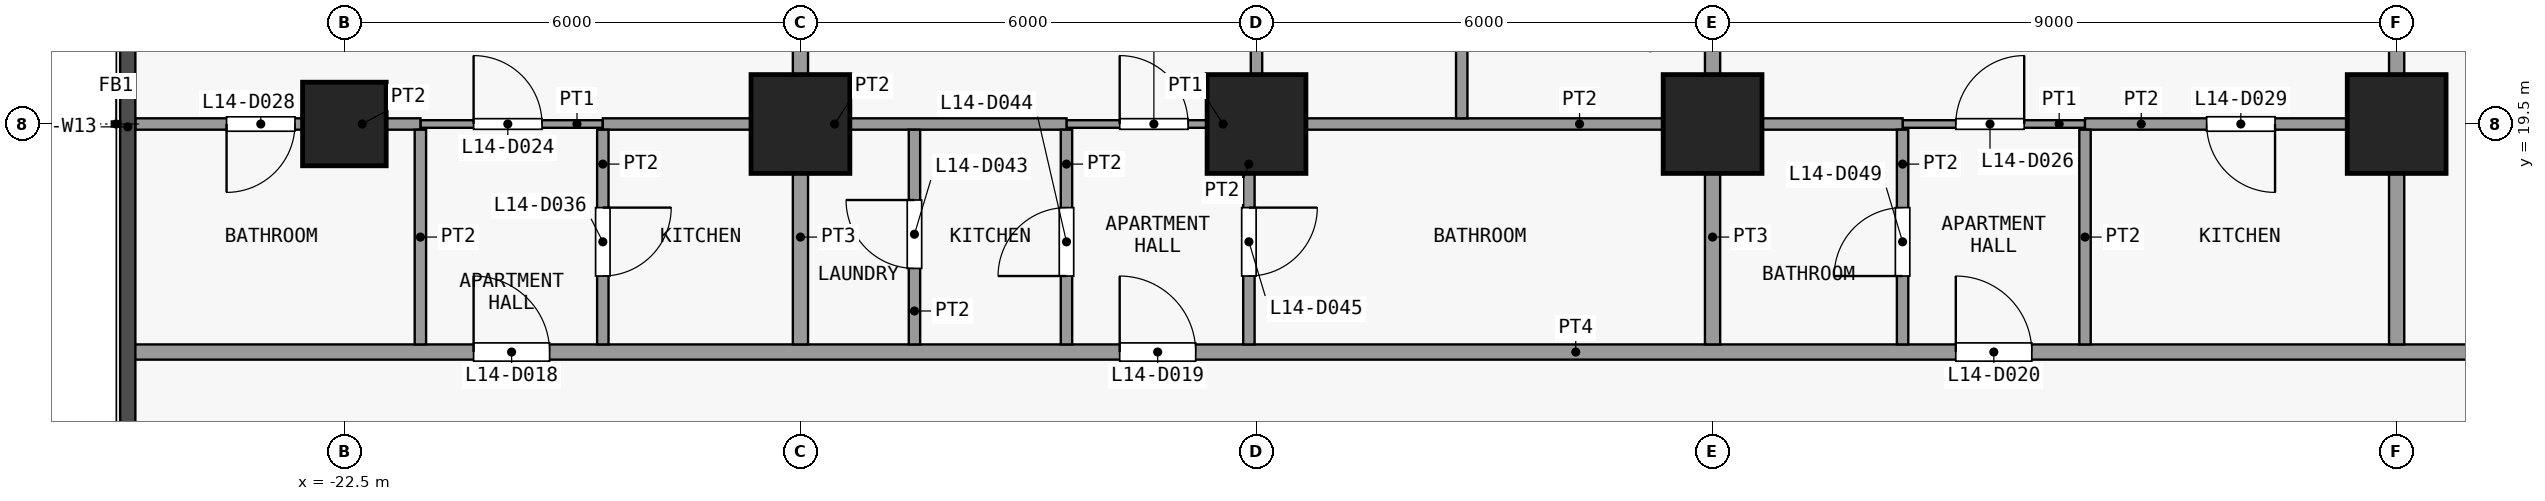
"""IFC4 building model, lengths in metres.
Left out: names, types, materials, properties, quantities, classifications, styles, units other than length and angle.
Written with IfcOpenShell. Run it as: python <this file> out.ifc"""

import sys

from ifc_helpers import new_model, si_unit, direction, frame, frame_2d, origin, origin_2d, place, context, subcontext, project, spatial, rectangle, extrude, element, fill, save


model = new_model("IFC4")
c1 = context("Model", 3, precision=1e-05, world=origin(), true_north=direction((0.0, 1.0)))
c2 = subcontext(c1, "Body", "Model", "MODEL_VIEW")
j1 = project(units=[si_unit("LENGTHUNIT", "METRE"), si_unit("PLANEANGLEUNIT", "RADIAN")], contexts=[c1])
p1 = place(None, origin())
s1 = spatial("IfcSite", under=j1, at=p1, CompositionType="ELEMENT")
p2 = place(p1, origin())
s2 = spatial("IfcBuilding", under=s1, at=p2, CompositionType="ELEMENT")
p3 = place(p2, frame((0.0, 0.0, 61.3)))
s3 = spatial("IfcBuildingStorey", under=s2, at=p3, CompositionType="ELEMENT", Elevation=61.3)
p4 = place(p3, frame((-22.5, 19.5, 0.0), z_axis=(0.0, 0.0, 1.0), x_axis=(1.0, 0.0, 0.0)))
e1 = element("IfcColumn", 1, at=p4, inside=s3, PredefinedType="COLUMN", context=c2, shape_type="SweptSolid", body=[
    extrude(rectangle(XDim=1.1, YDim=1.1, at=origin_2d()), origin(), (0.0, 0.0, 1.0), 3.6),
])
for number, where, z_axis, x_axis in (
    (2, (-16.5, 19.5, 0.0), (0.0, 0.0, 1.0), (1.0, 0.0, 0.0)),
    (3, (-10.5, 19.5, 0.0), (0.0, 0.0, 1.0), (1.0, 0.0, 0.0)),
    (4, (-4.5, 19.5, 0.0), (0.0, 0.0, 1.0), (1.0, 0.0, 0.0)),
    (5, (4.5, 19.5, 0.0), (0.0, 0.0, 1.0), (1.0, 0.0, 0.0)),
):
    element("IfcColumn", number, at=place(p3, frame(where, z_axis=z_axis, x_axis=x_axis)), inside=s3, PredefinedType="COLUMN", context=c2, shape_type="SweptSolid", body=[
        extrude(rectangle(XDim=1.3, YDim=1.3, at=origin_2d()), origin(), (0.0, 0.0, 1.0), 3.6),
    ])
p5 = place(p3, frame((-25.35, 16.5, 0.0), z_axis=(0.0, 0.0, 1.0), x_axis=(1.0, 0.0, 0.0)))
e6 = element("IfcWall", 6, at=p5, inside=s3, PredefinedType="PARTITIONING", context=c2, shape_type="SweptSolid", body=[
    extrude(rectangle(XDim=50.7, YDim=0.2, at=frame_2d((25.35, 0.0))), origin(), (0.0, 0.0, 1.0), 3.3),
])
p6 = place(p5, frame((4.55, 0.0, 0.0)))
e7 = element("IfcOpeningElement", 7, at=p6, cuts=e6, PredefinedType="OPENING", context=c2, shape_type="SweptSolid", body=[
    extrude(rectangle(XDim=1.0, YDim=2.1, at=frame_2d((0.5, 1.05))), frame((0.0, 0.11, 0.0), z_axis=(0.0, -1.0, 0.0), x_axis=(1.0, 0.0, 0.0)), (0.0, 0.0, 1.0), 0.22),
])
p7 = place(p5, frame((13.05, 0.0, 0.0)))
e8 = element("IfcOpeningElement", 8, at=p7, cuts=e6, PredefinedType="OPENING", context=c2, shape_type="SweptSolid", body=[
    extrude(rectangle(XDim=1.0, YDim=2.1, at=frame_2d((0.5, 1.05))), frame((0.0, 0.11, 0.0), z_axis=(0.0, -1.0, 0.0), x_axis=(1.0, 0.0, 0.0)), (0.0, 0.0, 1.0), 0.22),
])
p8 = place(p5, frame((24.05, 0.0, 0.0)))
e9 = element("IfcOpeningElement", 9, at=p8, cuts=e6, PredefinedType="OPENING", context=c2, shape_type="SweptSolid", body=[
    extrude(rectangle(XDim=1.0, YDim=2.1, at=frame_2d((0.5, 1.05))), frame((0.0, 0.11, 0.0), z_axis=(0.0, -1.0, 0.0), x_axis=(1.0, 0.0, 0.0)), (0.0, 0.0, 1.0), 0.22),
])
p9 = place(p5, frame((32.35, 0.0, 0.0)))
e10 = element("IfcOpeningElement", 10, at=p9, cuts=e6, PredefinedType="OPENING", context=c2, shape_type="SweptSolid", body=[
    extrude(rectangle(XDim=0.9, YDim=2.1, at=frame_2d((0.45, 1.05))), frame((0.0, 0.11, 0.0), z_axis=(0.0, -1.0, 0.0), x_axis=(1.0, 0.0, 0.0)), (0.0, 0.0, 1.0), 0.22),
])
p10 = place(p5, frame((38.35, 0.0, 0.0)))
e11 = element("IfcOpeningElement", 11, at=p10, cuts=e6, PredefinedType="OPENING", context=c2, shape_type="SweptSolid", body=[
    extrude(rectangle(XDim=0.9, YDim=2.1, at=frame_2d((0.45, 1.05))), frame((0.0, 0.11, 0.0), z_axis=(0.0, -1.0, 0.0), x_axis=(1.0, 0.0, 0.0)), (0.0, 0.0, 1.0), 0.22),
])
p11 = place(p5, frame((45.05, 0.0, 0.0)))
e12 = element("IfcOpeningElement", 12, at=p11, cuts=e6, PredefinedType="OPENING", context=c2, shape_type="SweptSolid", body=[
    extrude(rectangle(XDim=1.0, YDim=2.1, at=frame_2d((0.5, 1.05))), frame((0.0, 0.11, 0.0), z_axis=(0.0, -1.0, 0.0), x_axis=(1.0, 0.0, 0.0)), (0.0, 0.0, 1.0), 0.22),
])
p12 = place(p3, frame((-21.5, 19.5, 0.0), z_axis=(0.0, 0.0, 1.0), x_axis=(1.0, 0.0, 0.0)))
e13 = element("IfcWall", 13, at=p12, inside=s3, PredefinedType="PARTITIONING", context=c2, shape_type="SweptSolid", body=[
    extrude(rectangle(XDim=2.4, YDim=0.1, at=frame_2d((1.2, 0.0))), origin(), (0.0, 0.0, 1.0), 3.3),
])
p13 = place(p12, frame((0.7, 0.0, 0.0)))
e14 = element("IfcOpeningElement", 14, at=p13, cuts=e13, PredefinedType="OPENING", context=c2, shape_type="SweptSolid", body=[
    extrude(rectangle(XDim=0.9, YDim=2.1, at=frame_2d((0.45, 1.05))), frame((0.0, 0.06, 0.0), z_axis=(0.0, -1.0, 0.0), x_axis=(1.0, 0.0, 0.0)), (0.0, 0.0, 1.0), 0.12),
])
p14 = place(p3, frame((-13.0, 19.5, 0.0), z_axis=(0.0, 0.0, 1.0), x_axis=(1.0, 0.0, 0.0)))
e15 = element("IfcWall", 15, at=p14, inside=s3, PredefinedType="PARTITIONING", context=c2, shape_type="SweptSolid", body=[
    extrude(rectangle(XDim=2.4, YDim=0.1, at=frame_2d((1.2, 0.0))), origin(), (0.0, 0.0, 1.0), 3.3),
])
p15 = place(p14, frame((0.7, 0.0, 0.0)))
e16 = element("IfcOpeningElement", 16, at=p15, cuts=e15, PredefinedType="OPENING", context=c2, shape_type="SweptSolid", body=[
    extrude(rectangle(XDim=0.9, YDim=2.1, at=frame_2d((0.45, 1.05))), frame((0.0, 0.06, 0.0), z_axis=(0.0, -1.0, 0.0), x_axis=(1.0, 0.0, 0.0)), (0.0, 0.0, 1.0), 0.12),
])
p16 = place(p3, frame((-2.0, 19.5, 0.0), z_axis=(0.0, 0.0, 1.0), x_axis=(1.0, 0.0, 0.0)))
e17 = element("IfcWall", 17, at=p16, inside=s3, PredefinedType="PARTITIONING", context=c2, shape_type="SweptSolid", body=[
    extrude(rectangle(XDim=2.4, YDim=0.1, at=frame_2d((1.2, 0.0))), origin(), (0.0, 0.0, 1.0), 3.3),
])
p17 = place(p16, frame((0.7, 0.0, 0.0)))
e18 = element("IfcOpeningElement", 18, at=p17, cuts=e17, PredefinedType="OPENING", context=c2, shape_type="SweptSolid", body=[
    extrude(rectangle(XDim=0.9, YDim=2.1, at=frame_2d((0.45, 1.05))), frame((0.0, 0.06, 0.0), z_axis=(0.0, -1.0, 0.0), x_axis=(1.0, 0.0, 0.0)), (0.0, 0.0, 1.0), 0.12),
])
p18 = place(p3, frame((-25.25, 19.5, 0.0), z_axis=(0.0, 0.0, 1.0), x_axis=(1.0, 0.0, 0.0)))
e19 = element("IfcWall", 19, at=p18, inside=s3, PredefinedType="PARTITIONING", context=c2, shape_type="SweptSolid", body=[
    extrude(rectangle(XDim=3.75, YDim=0.15, at=frame_2d((1.875, 0.0))), origin(), (0.0, 0.0, 1.0), 3.3),
])
p19 = place(p18, frame((1.2, 0.0, 0.0)))
e20 = element("IfcOpeningElement", 20, at=p19, cuts=e19, PredefinedType="OPENING", context=c2, shape_type="SweptSolid", body=[
    extrude(rectangle(XDim=0.9, YDim=2.1, at=frame_2d((0.45, 1.05))), frame((0.0, 0.085, 0.0), z_axis=(0.0, -1.0, 0.0), x_axis=(1.0, 0.0, 0.0)), (0.0, 0.0, 1.0), 0.17),
])
p20 = place(p3, frame((-19.1, 19.5, 0.0), z_axis=(0.0, 0.0, 1.0), x_axis=(1.0, 0.0, 0.0)))
e21 = element("IfcWall", 21, at=p20, inside=s3, PredefinedType="PARTITIONING", context=c2, shape_type="SweptSolid", body=[
    extrude(rectangle(XDim=6.1, YDim=0.15, at=frame_2d((3.05, 0.0))), origin(), (0.0, 0.0, 1.0), 3.3),
])
p21 = place(p3, frame((-10.5, 19.5, 0.0), z_axis=(0.0, 0.0, 1.0), x_axis=(1.0, 0.0, 0.0)))
e22 = element("IfcWall", 22, at=p21, inside=s3, PredefinedType="PARTITIONING", context=c2, shape_type="SweptSolid", body=[
    extrude(rectangle(XDim=8.5, YDim=0.15, at=frame_2d((4.25, 0.0))), origin(), (0.0, 0.0, 1.0), 3.3),
])
p22 = place(p3, frame((0.4, 19.5, 0.0), z_axis=(0.0, 0.0, 1.0), x_axis=(1.0, 0.0, 0.0)))
e23 = element("IfcWall", 23, at=p22, inside=s3, PredefinedType="PARTITIONING", context=c2, shape_type="SweptSolid", body=[
    extrude(rectangle(XDim=4.0, YDim=0.15, at=frame_2d((2.0, 0.0))), origin(), (0.0, 0.0, 1.0), 3.3),
])
p23 = place(p22, frame((1.6, 0.0, 0.0)))
e24 = element("IfcOpeningElement", 24, at=p23, cuts=e23, PredefinedType="OPENING", context=c2, shape_type="SweptSolid", body=[
    extrude(rectangle(XDim=0.9, YDim=2.1, at=frame_2d((0.45, 1.05))), frame((0.0, 0.085, 0.0), z_axis=(0.0, -1.0, 0.0), x_axis=(1.0, 0.0, 0.0)), (0.0, 0.0, 1.0), 0.17),
])
p24 = place(p3, frame((-21.5, 16.6, 0.0), z_axis=(0.0, 0.0, 1.0), x_axis=(0.0, 1.0, 0.0)))
e25 = element("IfcWall", 25, at=p24, inside=s3, PredefinedType="PARTITIONING", context=c2, shape_type="SweptSolid", body=[
    extrude(rectangle(XDim=2.825, YDim=0.15, at=frame_2d((1.413, 0.0))), origin(), (0.0, 0.0, 1.0), 3.3),
])
p25 = place(p3, frame((-19.1, 16.6, 0.0), z_axis=(0.0, 0.0, 1.0), x_axis=(0.0, 1.0, 0.0)))
e26 = element("IfcWall", 26, at=p25, inside=s3, PredefinedType="PARTITIONING", context=c2, shape_type="SweptSolid", body=[
    extrude(rectangle(XDim=2.825, YDim=0.15, at=frame_2d((1.413, 0.0))), origin(), (0.0, 0.0, 1.0), 3.3),
])
p26 = place(p25, frame((0.9, 0.0, 0.0)))
e27 = element("IfcOpeningElement", 27, at=p26, cuts=e26, PredefinedType="OPENING", context=c2, shape_type="SweptSolid", body=[
    extrude(rectangle(XDim=0.9, YDim=2.1, at=frame_2d((0.45, 1.05))), frame((0.0, 0.085, 0.0), z_axis=(0.0, -1.0, 0.0), x_axis=(1.0, 0.0, 0.0)), (0.0, 0.0, 1.0), 0.17),
])
p27 = place(p3, frame((-16.5, 16.6, 0.0), z_axis=(0.0, 0.0, 1.0), x_axis=(0.0, 1.0, 0.0)))
e28 = element("IfcWall", 28, at=p27, inside=s3, PredefinedType="PARTITIONING", context=c2, shape_type="SweptSolid", body=[
    extrude(rectangle(XDim=2.825, YDim=0.2, at=frame_2d((1.413, 0.0))), origin(), (0.0, 0.0, 1.0), 3.3),
])
p28 = place(p3, frame((-16.5, 19.575, 0.0), z_axis=(0.0, 0.0, 1.0), x_axis=(0.0, 1.0, 0.0)))
e29 = element("IfcWall", 29, at=p28, inside=s3, PredefinedType="PARTITIONING", context=c2, shape_type="SweptSolid", body=[
    extrude(rectangle(XDim=7.275, YDim=0.2, at=frame_2d((3.638, 0.0))), origin(), (0.0, 0.0, 1.0), 3.3),
])
p29 = place(p3, frame((-15.0, 16.6, 0.0), z_axis=(0.0, 0.0, 1.0), x_axis=(0.0, 1.0, 0.0)))
e30 = element("IfcWall", 30, at=p29, inside=s3, PredefinedType="PARTITIONING", context=c2, shape_type="SweptSolid", body=[
    extrude(rectangle(XDim=2.825, YDim=0.15, at=frame_2d((1.413, 0.0))), origin(), (0.0, 0.0, 1.0), 3.3),
])
p30 = place(p29, frame((1.0, 0.0, 0.0)))
e31 = element("IfcOpeningElement", 31, at=p30, cuts=e30, PredefinedType="OPENING", context=c2, shape_type="SweptSolid", body=[
    extrude(rectangle(XDim=0.9, YDim=2.1, at=frame_2d((0.45, 1.05))), frame((0.0, 0.085, 0.0), z_axis=(0.0, -1.0, 0.0), x_axis=(1.0, 0.0, 0.0)), (0.0, 0.0, 1.0), 0.17),
])
p31 = place(p3, frame((-13.0, 16.6, 0.0), z_axis=(0.0, 0.0, 1.0), x_axis=(0.0, 1.0, 0.0)))
e32 = element("IfcWall", 32, at=p31, inside=s3, PredefinedType="PARTITIONING", context=c2, shape_type="SweptSolid", body=[
    extrude(rectangle(XDim=2.825, YDim=0.15, at=frame_2d((1.413, 0.0))), origin(), (0.0, 0.0, 1.0), 3.3),
])
p32 = place(p31, frame((0.9, 0.0, 0.0)))
e33 = element("IfcOpeningElement", 33, at=p32, cuts=e32, PredefinedType="OPENING", context=c2, shape_type="SweptSolid", body=[
    extrude(rectangle(XDim=0.9, YDim=2.1, at=frame_2d((0.45, 1.05))), frame((0.0, 0.085, 0.0), z_axis=(0.0, -1.0, 0.0), x_axis=(1.0, 0.0, 0.0)), (0.0, 0.0, 1.0), 0.17),
])
p33 = place(p3, frame((-10.6, 16.6, 0.0), z_axis=(0.0, 0.0, 1.0), x_axis=(0.0, 1.0, 0.0)))
e34 = element("IfcWall", 34, at=p33, inside=s3, PredefinedType="PARTITIONING", context=c2, shape_type="SweptSolid", body=[
    extrude(rectangle(XDim=2.825, YDim=0.15, at=frame_2d((1.413, 0.0))), origin(), (0.0, 0.0, 1.0), 3.3),
])
p34 = place(p33, frame((0.9, 0.0, 0.0)))
e35 = element("IfcOpeningElement", 35, at=p34, cuts=e34, PredefinedType="OPENING", context=c2, shape_type="SweptSolid", body=[
    extrude(rectangle(XDim=0.9, YDim=2.1, at=frame_2d((0.45, 1.05))), frame((0.0, 0.085, 0.0), z_axis=(0.0, -1.0, 0.0), x_axis=(1.0, 0.0, 0.0)), (0.0, 0.0, 1.0), 0.17),
])
p35 = place(p3, frame((-10.5, 19.575, 0.0), z_axis=(0.0, 0.0, 1.0), x_axis=(0.0, 1.0, 0.0)))
e36 = element("IfcWall", 36, at=p35, inside=s3, PredefinedType="PARTITIONING", context=c2, shape_type="SweptSolid", body=[
    extrude(rectangle(XDim=2.925, YDim=0.15, at=frame_2d((1.462, 0.0))), origin(), (0.0, 0.0, 1.0), 3.3),
])
p36 = place(p3, frame((-7.8, 19.575, 0.0), z_axis=(0.0, 0.0, 1.0), x_axis=(0.0, 1.0, 0.0)))
e37 = element("IfcWall", 37, at=p36, inside=s3, PredefinedType="PARTITIONING", context=c2, shape_type="SweptSolid", body=[
    extrude(rectangle(XDim=2.85, YDim=0.15, at=frame_2d((1.425, 0.0))), origin(), (0.0, 0.0, 1.0), 3.3),
])
p37 = place(p3, frame((-4.5, 16.6, 0.0), z_axis=(0.0, 0.0, 1.0), x_axis=(0.0, 1.0, 0.0)))
e38 = element("IfcWall", 38, at=p37, inside=s3, PredefinedType="PARTITIONING", context=c2, shape_type="SweptSolid", body=[
    extrude(rectangle(XDim=2.825, YDim=0.2, at=frame_2d((1.413, 0.0))), origin(), (0.0, 0.0, 1.0), 3.3),
])
p38 = place(p3, frame((-4.5, 19.575, 0.0), z_axis=(0.0, 0.0, 1.0), x_axis=(0.0, 1.0, 0.0)))
e39 = element("IfcWall", 39, at=p38, inside=s3, PredefinedType="PARTITIONING", context=c2, shape_type="SweptSolid", body=[
    extrude(rectangle(XDim=8.675, YDim=0.2, at=frame_2d((4.337, 0.0))), origin(), (0.0, 0.0, 1.0), 3.3),
])
p39 = place(p3, frame((-2.0, 16.6, 0.0), z_axis=(0.0, 0.0, 1.0), x_axis=(0.0, 1.0, 0.0)))
e40 = element("IfcWall", 40, at=p39, inside=s3, PredefinedType="PARTITIONING", context=c2, shape_type="SweptSolid", body=[
    extrude(rectangle(XDim=2.825, YDim=0.15, at=frame_2d((1.413, 0.0))), origin(), (0.0, 0.0, 1.0), 3.3),
])
p40 = place(p39, frame((0.9, 0.0, 0.0)))
e41 = element("IfcOpeningElement", 41, at=p40, cuts=e40, PredefinedType="OPENING", context=c2, shape_type="SweptSolid", body=[
    extrude(rectangle(XDim=0.9, YDim=2.1, at=frame_2d((0.45, 1.05))), frame((0.0, 0.085, 0.0), z_axis=(0.0, -1.0, 0.0), x_axis=(1.0, 0.0, 0.0)), (0.0, 0.0, 1.0), 0.17),
])
p41 = place(p3, frame((0.4, 16.6, 0.0), z_axis=(0.0, 0.0, 1.0), x_axis=(0.0, 1.0, 0.0)))
e42 = element("IfcWall", 42, at=p41, inside=s3, PredefinedType="PARTITIONING", context=c2, shape_type="SweptSolid", body=[
    extrude(rectangle(XDim=2.825, YDim=0.15, at=frame_2d((1.413, 0.0))), origin(), (0.0, 0.0, 1.0), 3.3),
])
p42 = place(p3, frame((4.5, 16.6, 0.0), z_axis=(0.0, 0.0, 1.0), x_axis=(0.0, 1.0, 0.0)))
e43 = element("IfcWall", 43, at=p42, inside=s3, PredefinedType="PARTITIONING", context=c2, shape_type="SweptSolid", body=[
    extrude(rectangle(XDim=11.65, YDim=0.2, at=frame_2d((5.825, 0.0))), origin(), (0.0, 0.0, 1.0), 3.3),
])
p43 = place(p6, origin())
e44 = element("IfcDoor", 44, at=p43, inside=s3, OperationType="SINGLE_SWING_RIGHT", PredefinedType="DOOR", context=c2, shape_type="SweptSolid", body=[
    extrude(rectangle(XDim=1.0, YDim=2.1, at=frame_2d((0.5, 1.05))), frame((0.0, 0.025, 0.0), z_axis=(0.0, -1.0, 0.0), x_axis=(1.0, 0.0, 0.0)), (0.0, 0.0, 1.0), 0.05),
])
fill(e7, e44)
p44 = place(p7, origin())
e45 = element("IfcDoor", 45, at=p44, inside=s3, OperationType="SINGLE_SWING_RIGHT", PredefinedType="DOOR", context=c2, shape_type="SweptSolid", body=[
    extrude(rectangle(XDim=1.0, YDim=2.1, at=frame_2d((0.5, 1.05))), frame((0.0, 0.025, 0.0), z_axis=(0.0, -1.0, 0.0), x_axis=(1.0, 0.0, 0.0)), (0.0, 0.0, 1.0), 0.05),
])
fill(e8, e45)
p45 = place(p8, origin())
e46 = element("IfcDoor", 46, at=p45, inside=s3, OperationType="SINGLE_SWING_RIGHT", PredefinedType="DOOR", context=c2, shape_type="SweptSolid", body=[
    extrude(rectangle(XDim=1.0, YDim=2.1, at=frame_2d((0.5, 1.05))), frame((0.0, 0.025, 0.0), z_axis=(0.0, -1.0, 0.0), x_axis=(1.0, 0.0, 0.0)), (0.0, 0.0, 1.0), 0.05),
])
fill(e9, e46)
p46 = place(p13, origin())
e47 = element("IfcDoor", 47, at=p46, inside=s3, OperationType="SINGLE_SWING_RIGHT", PredefinedType="DOOR", context=c2, shape_type="SweptSolid", body=[
    extrude(rectangle(XDim=0.9, YDim=2.1, at=frame_2d((0.45, 1.05))), frame((0.0, 0.025, 0.0), z_axis=(0.0, -1.0, 0.0), x_axis=(1.0, 0.0, 0.0)), (0.0, 0.0, 1.0), 0.05),
])
fill(e14, e47)
p47 = place(p15, origin())
e48 = element("IfcDoor", 48, at=p47, inside=s3, OperationType="SINGLE_SWING_RIGHT", PredefinedType="DOOR", context=c2, shape_type="SweptSolid", body=[
    extrude(rectangle(XDim=0.9, YDim=2.1, at=frame_2d((0.45, 1.05))), frame((0.0, 0.025, 0.0), z_axis=(0.0, -1.0, 0.0), x_axis=(1.0, 0.0, 0.0)), (0.0, 0.0, 1.0), 0.05),
])
fill(e16, e48)
p48 = place(p17, origin())
e49 = element("IfcDoor", 49, at=p48, inside=s3, OperationType="SINGLE_SWING_LEFT", PredefinedType="DOOR", context=c2, shape_type="SweptSolid", body=[
    extrude(rectangle(XDim=0.9, YDim=2.1, at=frame_2d((0.45, 1.05))), frame((0.0, 0.025, 0.0), z_axis=(0.0, -1.0, 0.0), x_axis=(1.0, 0.0, 0.0)), (0.0, 0.0, 1.0), 0.05),
])
fill(e18, e49)
p49 = place(p19, origin())
e50 = element("IfcDoor", 50, at=p49, inside=s3, OperationType="SINGLE_SWING_LEFT", PredefinedType="DOOR", context=c2, shape_type="SweptSolid", body=[
    extrude(rectangle(XDim=0.9, YDim=2.1, at=frame_2d((0.45, 1.05))), frame((0.0, 0.025, 0.0), z_axis=(0.0, -1.0, 0.0), x_axis=(1.0, 0.0, 0.0)), (0.0, 0.0, 1.0), 0.05),
])
fill(e20, e50)
p50 = place(p23, origin())
e51 = element("IfcDoor", 51, at=p50, inside=s3, OperationType="SINGLE_SWING_RIGHT", PredefinedType="DOOR", context=c2, shape_type="SweptSolid", body=[
    extrude(rectangle(XDim=0.9, YDim=2.1, at=frame_2d((0.45, 1.05))), frame((0.0, 0.025, 0.0), z_axis=(0.0, -1.0, 0.0), x_axis=(1.0, 0.0, 0.0)), (0.0, 0.0, 1.0), 0.05),
])
fill(e24, e51)
p51 = place(p26, origin())
e52 = element("IfcDoor", 52, at=p51, inside=s3, OperationType="SINGLE_SWING_RIGHT", PredefinedType="DOOR", context=c2, shape_type="SweptSolid", body=[
    extrude(rectangle(XDim=0.9, YDim=2.1, at=frame_2d((0.45, 1.05))), frame((0.0, 0.025, 0.0), z_axis=(0.0, -1.0, 0.0), x_axis=(1.0, 0.0, 0.0)), (0.0, 0.0, 1.0), 0.05),
])
fill(e27, e52)
p52 = place(p30, origin())
e53 = element("IfcDoor", 53, at=p52, inside=s3, OperationType="SINGLE_SWING_LEFT", PredefinedType="DOOR", context=c2, shape_type="SweptSolid", body=[
    extrude(rectangle(XDim=0.9, YDim=2.1, at=frame_2d((0.45, 1.05))), frame((0.0, 0.025, 0.0), z_axis=(0.0, -1.0, 0.0), x_axis=(1.0, 0.0, 0.0)), (0.0, 0.0, 1.0), 0.05),
])
fill(e31, e53)
p53 = place(p32, origin())
e54 = element("IfcDoor", 54, at=p53, inside=s3, OperationType="SINGLE_SWING_RIGHT", PredefinedType="DOOR", context=c2, shape_type="SweptSolid", body=[
    extrude(rectangle(XDim=0.9, YDim=2.1, at=frame_2d((0.45, 1.05))), frame((0.0, 0.025, 0.0), z_axis=(0.0, -1.0, 0.0), x_axis=(1.0, 0.0, 0.0)), (0.0, 0.0, 1.0), 0.05),
])
fill(e33, e54)
p54 = place(p34, origin())
e55 = element("IfcDoor", 55, at=p54, inside=s3, OperationType="SINGLE_SWING_RIGHT", PredefinedType="DOOR", context=c2, shape_type="SweptSolid", body=[
    extrude(rectangle(XDim=0.9, YDim=2.1, at=frame_2d((0.45, 1.05))), frame((0.0, 0.025, 0.0), z_axis=(0.0, -1.0, 0.0), x_axis=(1.0, 0.0, 0.0)), (0.0, 0.0, 1.0), 0.05),
])
fill(e35, e55)
p55 = place(p40, origin())
e56 = element("IfcDoor", 56, at=p55, inside=s3, OperationType="SINGLE_SWING_RIGHT", PredefinedType="DOOR", context=c2, shape_type="SweptSolid", body=[
    extrude(rectangle(XDim=0.9, YDim=2.1, at=frame_2d((0.45, 1.05))), frame((0.0, 0.025, 0.0), z_axis=(0.0, -1.0, 0.0), x_axis=(1.0, 0.0, 0.0)), (0.0, 0.0, 1.0), 0.05),
])
fill(e41, e56)
save(model, sys.argv[1])
